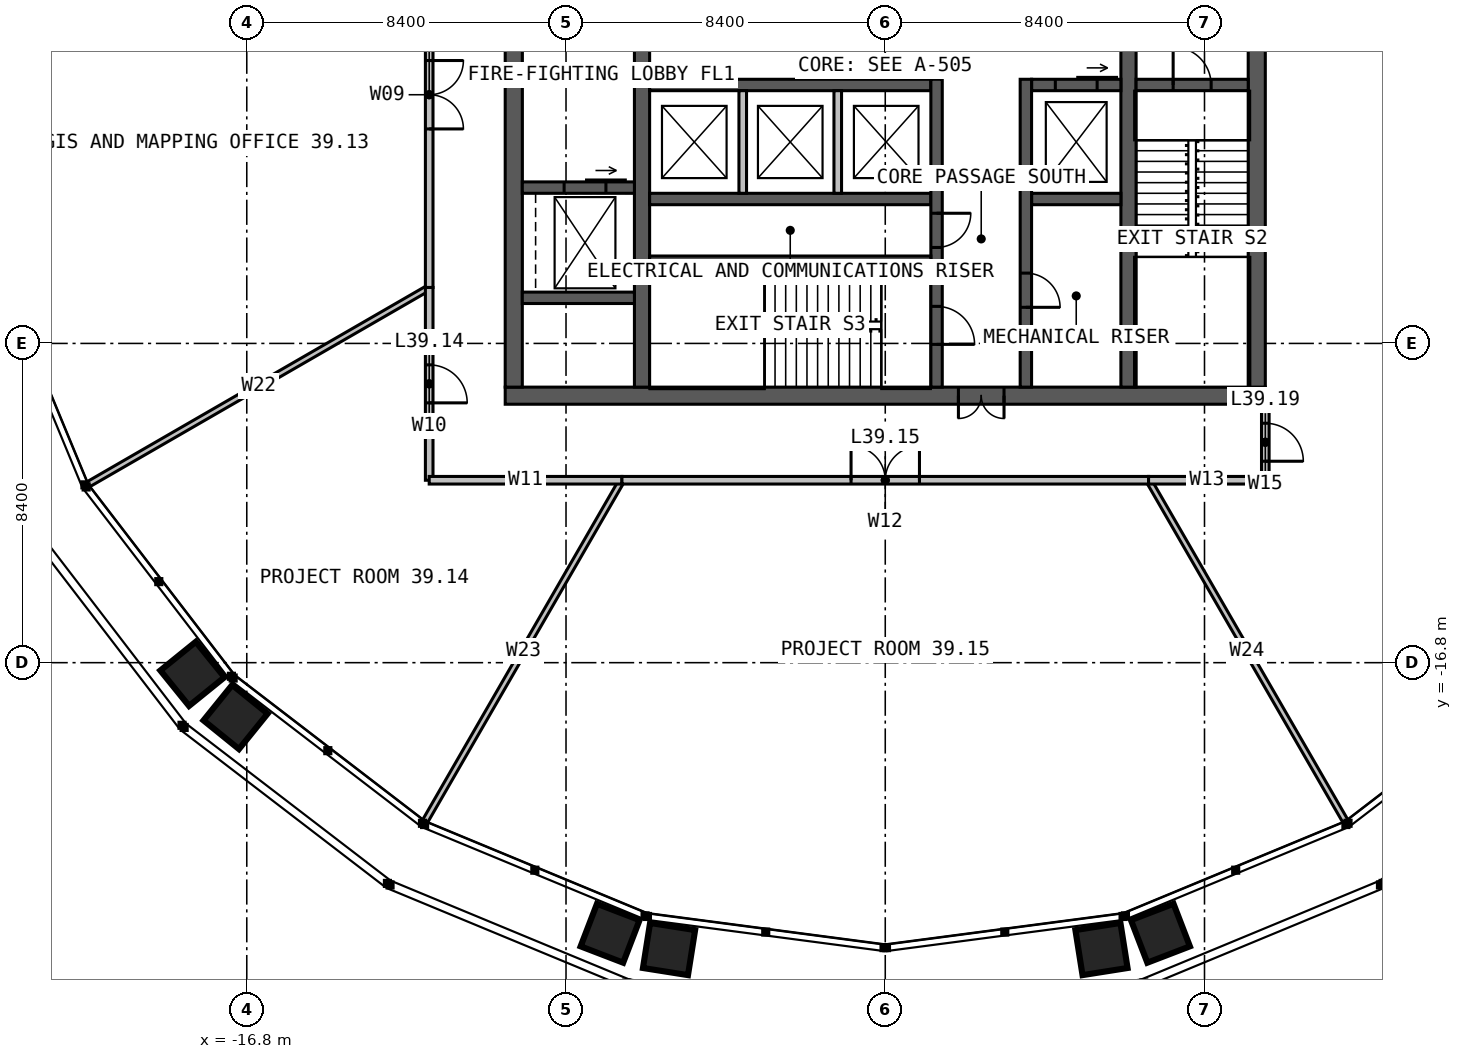
"""IFC4 building model, lengths in metres.
Left out: names, types, materials, properties, quantities, classifications, styles, units other than length and angle.
Written with IfcOpenShell. Run it as: python <this file> out.ifc"""

import sys

from ifc_helpers import new_model, si_unit, direction, frame, frame_2d, origin, place, context, subcontext, project, spatial, rectangle, extrude, element, fill, save


model = new_model("IFC4")
c1 = context("Model", 3, precision=1e-05, world=origin(), true_north=direction((0.0, 1.0)))
c2 = subcontext(c1, "Body", "Model", "MODEL_VIEW")
j1 = project(units=[si_unit("LENGTHUNIT", "METRE"), si_unit("PLANEANGLEUNIT", "RADIAN")], contexts=[c1])
p1 = place(None, origin())
s1 = spatial("IfcSite", under=j1, at=p1, CompositionType="ELEMENT")
p2 = place(p1, origin())
s2 = spatial("IfcBuilding", under=s1, at=p2, CompositionType="ELEMENT")
p3 = place(p2, frame((0.0, 0.0, 163.0)))
s3 = spatial("IfcBuildingStorey", under=s2, at=p3, CompositionType="ELEMENT", Elevation=163.0)
p4 = place(p3, frame((10.0, -9.775, 0.0), z_axis=(0.0, 0.0, 1.0), x_axis=(-1.0, 0.0, 0.0)))
e1 = element("IfcWall", 1, at=p4, inside=s3, PredefinedType="SOLIDWALL", context=c2, shape_type="SweptSolid", body=[
    extrude(rectangle(XDim=20.0, YDim=0.45, at=frame_2d((10.0, 0.0))), origin(), (0.0, 0.0, 1.0), 4.0),
])
p5 = place(p4, frame((6.875, 0.0, 0.0)))
e2 = element("IfcOpeningElement", 2, at=p5, cuts=e1, PredefinedType="OPENING", context=c2, shape_type="SweptSolid", body=[
    extrude(rectangle(XDim=1.2, YDim=2.2, at=frame_2d((0.6, 1.1))), frame((0.0, 0.235, 0.0), z_axis=(0.0, -1.0, 0.0), x_axis=(1.0, 0.0, 0.0)), (0.0, 0.0, 1.0), 0.47),
])
for number, where, z_axis, x_axis in (
    (3, (9.775, -9.55, 0.0), (0.0, 0.0, 1.0), (0.0, 1.0, 0.0)),
    (4, (-9.775, 9.55, 0.0), (0.0, 0.0, 1.0), (0.0, -1.0, 0.0)),
):
    element("IfcWall", number, at=place(p3, frame(where, z_axis=z_axis, x_axis=x_axis)), inside=s3, PredefinedType="SOLIDWALL", context=c2, shape_type="SweptSolid", body=[
        extrude(rectangle(XDim=19.1, YDim=0.45, at=frame_2d((9.55, 0.0))), origin(), (0.0, 0.0, 1.0), 4.0),
    ])
p6 = place(p3, frame((-6.4, -9.55, 0.0), z_axis=(0.0, 0.0, 1.0), x_axis=(0.0, 1.0, 0.0)))
e5 = element("IfcWall", 5, at=p6, inside=s3, PredefinedType="SOLIDWALL", context=c2, shape_type="SweptSolid", body=[
    extrude(rectangle(XDim=19.1, YDim=0.4, at=frame_2d((9.55, 0.0))), origin(), (0.0, 0.0, 1.0), 4.0),
])
p7 = place(p6, frame((9.05, 0.0, 0.0)))
e6 = element("IfcOpeningElement", 6, at=p7, cuts=e5, PredefinedType="OPENING", context=c2, shape_type="SweptSolid", body=[
    extrude(rectangle(XDim=1.0, YDim=2.2, at=frame_2d((0.5, 1.1))), frame((0.0, 0.21, 0.0), z_axis=(0.0, -1.0, 0.0), x_axis=(1.0, 0.0, 0.0)), (0.0, 0.0, 1.0), 0.42),
])
p8 = place(p3, frame((6.4, 9.55, 0.0), z_axis=(0.0, 0.0, 1.0), x_axis=(0.0, -1.0, 0.0)))
e7 = element("IfcWall", 7, at=p8, inside=s3, PredefinedType="SOLIDWALL", context=c2, shape_type="SweptSolid", body=[
    extrude(rectangle(XDim=19.1, YDim=0.4, at=frame_2d((9.55, 0.0))), origin(), (0.0, 0.0, 1.0), 4.0),
])
p9 = place(p8, frame((9.05, 0.0, 0.0)))
e8 = element("IfcOpeningElement", 8, at=p9, cuts=e7, PredefinedType="OPENING", context=c2, shape_type="SweptSolid", body=[
    extrude(rectangle(XDim=1.0, YDim=2.2, at=frame_2d((0.5, 1.1))), frame((0.0, 0.21, 0.0), z_axis=(0.0, -1.0, 0.0), x_axis=(1.0, 0.0, 0.0)), (0.0, 0.0, 1.0), 0.42),
])
p10 = place(p3, frame((-6.2, -1.6, 0.0), z_axis=(0.0, 0.0, 1.0), x_axis=(1.0, 0.0, 0.0)))
e9 = element("IfcWall", 9, at=p10, inside=s3, PredefinedType="SOLIDWALL", context=c2, shape_type="SweptSolid", body=[
    extrude(rectangle(XDim=7.4, YDim=0.3, at=frame_2d((3.7, 0.0))), origin(), (0.0, 0.0, 1.0), 4.0),
])
p11 = place(p3, frame((3.85, -1.6, 0.0), z_axis=(0.0, 0.0, 1.0), x_axis=(1.0, 0.0, 0.0)))
e10 = element("IfcWall", 10, at=p11, inside=s3, PredefinedType="SOLIDWALL", context=c2, shape_type="SweptSolid", body=[
    extrude(rectangle(XDim=2.35, YDim=0.3, at=frame_2d((1.175, 0.0))), origin(), (0.0, 0.0, 1.0), 4.0),
])
p12 = place(p11, frame((0.625, 0.0, 0.0)))
e11 = element("IfcOpeningElement", 11, at=p12, cuts=e10, PredefinedType="OPENING", context=c2, shape_type="SweptSolid", body=[
    extrude(rectangle(XDim=1.1, YDim=2.2, at=frame_2d((0.55, 1.1))), frame((0.0, 0.16, 0.0), z_axis=(0.0, -1.0, 0.0), x_axis=(1.0, 0.0, 0.0)), (0.0, 0.0, 1.0), 0.32),
])
p13 = place(p3, frame((-6.2, -4.6, 0.0), z_axis=(0.0, 0.0, 1.0), x_axis=(1.0, 0.0, 0.0)))
e12 = element("IfcWall", 12, at=p13, inside=s3, PredefinedType="SOLIDWALL", context=c2, shape_type="SweptSolid", body=[
    extrude(rectangle(XDim=7.4, YDim=0.3, at=frame_2d((3.7, 0.0))), origin(), (0.0, 0.0, 1.0), 4.0),
])
p14 = place(p3, frame((3.85, -4.6, 0.0), z_axis=(0.0, 0.0, 1.0), x_axis=(1.0, 0.0, 0.0)))
e13 = element("IfcWall", 13, at=p14, inside=s3, PredefinedType="SOLIDWALL", context=c2, shape_type="SweptSolid", body=[
    extrude(rectangle(XDim=2.35, YDim=0.3, at=frame_2d((1.175, 0.0))), origin(), (0.0, 0.0, 1.0), 4.0),
])
p15 = place(p3, frame((1.35, -1.45, 0.0), z_axis=(0.0, 0.0, 1.0), x_axis=(0.0, -1.0, 0.0)))
e14 = element("IfcWall", 14, at=p15, inside=s3, PredefinedType="SOLIDWALL", context=c2, shape_type="SweptSolid", body=[
    extrude(rectangle(XDim=8.1, YDim=0.3, at=frame_2d((4.05, 0.0))), origin(), (0.0, 0.0, 1.0), 4.0),
])
p16 = place(p15, frame((5.975, 0.0, 0.0)))
e15 = element("IfcOpeningElement", 15, at=p16, cuts=e14, PredefinedType="OPENING", context=c2, shape_type="SweptSolid", body=[
    extrude(rectangle(XDim=1.0, YDim=2.2, at=frame_2d((0.5, 1.1))), frame((0.0, 0.16, 0.0), z_axis=(0.0, -1.0, 0.0), x_axis=(1.0, 0.0, 0.0)), (0.0, 0.0, 1.0), 0.32),
])
p17 = place(p15, frame((3.525, 0.0, 0.0)))
e16 = element("IfcOpeningElement", 16, at=p17, cuts=e14, PredefinedType="OPENING", context=c2, shape_type="SweptSolid", body=[
    extrude(rectangle(XDim=0.9, YDim=2.2, at=frame_2d((0.45, 1.1))), frame((0.0, 0.16, 0.0), z_axis=(0.0, -1.0, 0.0), x_axis=(1.0, 0.0, 0.0)), (0.0, 0.0, 1.0), 0.32),
])
p18 = place(p3, frame((3.7, -1.45, 0.0), z_axis=(0.0, 0.0, 1.0), x_axis=(0.0, -1.0, 0.0)))
e17 = element("IfcWall", 17, at=p18, inside=s3, PredefinedType="SOLIDWALL", context=c2, shape_type="SweptSolid", body=[
    extrude(rectangle(XDim=8.1, YDim=0.3, at=frame_2d((4.05, 0.0))), origin(), (0.0, 0.0, 1.0), 4.0),
])
p19 = place(p18, frame((5.1, 0.0, 0.0)))
e18 = element("IfcOpeningElement", 18, at=p19, cuts=e17, PredefinedType="OPENING", context=c2, shape_type="SweptSolid", body=[
    extrude(rectangle(XDim=0.9, YDim=2.2, at=frame_2d((0.45, 1.1))), frame((0.0, 0.16, 0.0), z_axis=(0.0, -1.0, 0.0), x_axis=(1.0, 0.0, 0.0)), (0.0, 0.0, 1.0), 0.32),
])
p20 = place(p3, frame((-6.2, -6.2, 0.0), z_axis=(0.0, 0.0, 1.0), x_axis=(1.0, 0.0, 0.0)))
e19 = element("IfcWall", 19, at=p20, inside=s3, PredefinedType="SOLIDWALL", context=c2, shape_type="SweptSolid", body=[
    extrude(rectangle(XDim=7.4, YDim=0.2, at=frame_2d((3.7, 0.0))), origin(), (0.0, 0.0, 1.0), 4.0),
])
p21 = place(p3, frame((6.6, -1.6, 0.0), z_axis=(0.0, 0.0, 1.0), x_axis=(1.0, 0.0, 0.0)))
e20 = element("IfcWall", 20, at=p21, inside=s3, PredefinedType="SOLIDWALL", context=c2, shape_type="SweptSolid", body=[
    extrude(rectangle(XDim=2.95, YDim=0.3, at=frame_2d((1.475, 0.0))), origin(), (0.0, 0.0, 1.0), 4.0),
])
p22 = place(p21, frame((0.975, 0.0, 0.0)))
e21 = element("IfcOpeningElement", 21, at=p22, cuts=e20, PredefinedType="OPENING", context=c2, shape_type="SweptSolid", body=[
    extrude(rectangle(XDim=1.0, YDim=2.2, at=frame_2d((0.5, 1.1))), frame((0.0, 0.16, 0.0), z_axis=(0.0, -1.0, 0.0), x_axis=(1.0, 0.0, 0.0)), (0.0, 0.0, 1.0), 0.32),
])
p23 = place(p3, frame((-9.55, -4.3, 0.0), z_axis=(0.0, 0.0, 1.0), x_axis=(1.0, 0.0, 0.0)))
e22 = element("IfcWall", 22, at=p23, inside=s3, PredefinedType="SOLIDWALL", context=c2, shape_type="SweptSolid", body=[
    extrude(rectangle(XDim=2.95, YDim=0.3, at=frame_2d((1.475, 0.0))), origin(), (0.0, 0.0, 1.0), 4.0),
])
p24 = place(p23, frame((1.1, 0.0, 0.0)))
e23 = element("IfcOpeningElement", 23, at=p24, cuts=e22, PredefinedType="OPENING", context=c2, shape_type="SweptSolid", body=[
    extrude(rectangle(XDim=1.1, YDim=2.2, at=frame_2d((0.55, 1.1))), frame((0.0, 0.16, 0.0), z_axis=(0.0, -1.0, 0.0), x_axis=(1.0, 0.0, 0.0)), (0.0, 0.0, 1.0), 0.32),
])
p25 = place(p3, frame((-9.55, -7.2, 0.0), z_axis=(0.0, 0.0, 1.0), x_axis=(1.0, 0.0, 0.0)))
e24 = element("IfcWall", 24, at=p25, inside=s3, PredefinedType="SOLIDWALL", context=c2, shape_type="SweptSolid", body=[
    extrude(rectangle(XDim=2.95, YDim=0.3, at=frame_2d((1.475, 0.0))), origin(), (0.0, 0.0, 1.0), 4.0),
])
for number, where, z_axis, x_axis in (
    (25, (-3.75, -1.75, 0.0), (0.0, 0.0, 1.0), (0.0, -1.0, 0.0)),
    (26, (-1.25, -1.75, 0.0), (0.0, 0.0, 1.0), (0.0, -1.0, 0.0)),
):
    element("IfcWall", number, at=place(p3, frame(where, z_axis=z_axis, x_axis=x_axis)), inside=s3, PredefinedType="SOLIDWALL", context=c2, shape_type="SweptSolid", body=[
        extrude(rectangle(XDim=2.7, YDim=0.2, at=frame_2d((1.35, 0.0))), origin(), (0.0, 0.0, 1.0), 3.75),
    ])
for number, where, z_axis, x_axis in (
    (27, (-12.0, -6.928, 0.0), (0.0, 0.0, 1.0), (-0.866, -0.5, 0.0)),
    (28, (-6.928, -12.0, 0.0), (0.0, 0.0, 1.0), (-0.5, -0.866, 0.0)),
    (29, (6.928, -12.0, 0.0), (0.0, 0.0, 1.0), (0.5, -0.866, 0.0)),
):
    element("IfcWall", number, at=place(p3, frame(where, z_axis=z_axis, x_axis=x_axis)), inside=s3, PredefinedType="PARTITIONING", context=c2, shape_type="SweptSolid", body=[
        extrude(rectangle(XDim=10.355, YDim=0.15, at=frame_2d((5.177, 0.0))), origin(), (0.0, 0.0, 1.0), 2.79),
    ])
p26 = place(p3, frame((-12.0, 3.215, 0.0), z_axis=(0.0, 0.0, 1.0), x_axis=(0.0, -1.0, 0.0)))
e30 = element("IfcWall", 30, at=p26, inside=s3, PredefinedType="PARTITIONING", context=c2, shape_type="SweptSolid", body=[
    extrude(rectangle(XDim=10.144, YDim=0.2, at=frame_2d((5.072, 0.0))), origin(), (0.0, 0.0, 1.0), 3.8),
])
p27 = place(p26, frame((4.172, 0.0, 0.0)))
e31 = element("IfcOpeningElement", 31, at=p27, cuts=e30, PredefinedType="OPENING", context=c2, shape_type="SweptSolid", body=[
    extrude(rectangle(XDim=1.8, YDim=2.2, at=frame_2d((0.9, 1.1))), frame((0.0, 0.11, 0.0), z_axis=(0.0, -1.0, 0.0), x_axis=(1.0, 0.0, 0.0)), (0.0, 0.0, 1.0), 0.22),
])
p28 = place(p3, frame((-12.0, -6.928, 0.0), z_axis=(0.0, 0.0, 1.0), x_axis=(0.0, -1.0, 0.0)))
e32 = element("IfcWall", 32, at=p28, inside=s3, PredefinedType="PARTITIONING", context=c2, shape_type="SweptSolid", body=[
    extrude(rectangle(XDim=5.072, YDim=0.2, at=frame_2d((2.536, 0.0))), origin(), (0.0, 0.0, 1.0), 3.8),
])
p29 = place(p28, frame((2.036, 0.0, 0.0)))
e33 = element("IfcOpeningElement", 33, at=p29, cuts=e32, PredefinedType="OPENING", context=c2, shape_type="SweptSolid", body=[
    extrude(rectangle(XDim=1.0, YDim=2.2, at=frame_2d((0.5, 1.1))), frame((0.0, 0.11, 0.0), z_axis=(0.0, -1.0, 0.0), x_axis=(1.0, 0.0, 0.0)), (0.0, 0.0, 1.0), 0.22),
])
p30 = place(p3, frame((-12.0, -12.0, 0.0), z_axis=(0.0, 0.0, 1.0), x_axis=(1.0, 0.0, 0.0)))
e34 = element("IfcWall", 34, at=p30, inside=s3, PredefinedType="PARTITIONING", context=c2, shape_type="SweptSolid", body=[
    extrude(rectangle(XDim=5.072, YDim=0.2, at=frame_2d((2.536, 0.0))), origin(), (0.0, 0.0, 1.0), 3.8),
])
p31 = place(p3, frame((-6.928, -12.0, 0.0), z_axis=(0.0, 0.0, 1.0), x_axis=(1.0, 0.0, 0.0)))
e35 = element("IfcWall", 35, at=p31, inside=s3, PredefinedType="PARTITIONING", context=c2, shape_type="SweptSolid", body=[
    extrude(rectangle(XDim=13.856, YDim=0.2, at=frame_2d((6.928, 0.0))), origin(), (0.0, 0.0, 1.0), 3.8),
])
p32 = place(p31, frame((6.028, 0.0, 0.0)))
e36 = element("IfcOpeningElement", 36, at=p32, cuts=e35, PredefinedType="OPENING", context=c2, shape_type="SweptSolid", body=[
    extrude(rectangle(XDim=1.8, YDim=2.2, at=frame_2d((0.9, 1.1))), frame((0.0, 0.11, 0.0), z_axis=(0.0, -1.0, 0.0), x_axis=(1.0, 0.0, 0.0)), (0.0, 0.0, 1.0), 0.22),
])
p33 = place(p3, frame((6.928, -12.0, 0.0), z_axis=(0.0, 0.0, 1.0), x_axis=(1.0, 0.0, 0.0)))
e37 = element("IfcWall", 37, at=p33, inside=s3, PredefinedType="PARTITIONING", context=c2, shape_type="SweptSolid", body=[
    extrude(rectangle(XDim=3.072, YDim=0.2, at=frame_2d((1.536, 0.0))), origin(), (0.0, 0.0, 1.0), 3.8),
])
p34 = place(p3, frame((10.0, -10.0, 0.0), z_axis=(0.0, 0.0, 1.0), x_axis=(0.0, -1.0, 0.0)))
e38 = element("IfcWall", 38, at=p34, inside=s3, PredefinedType="PARTITIONING", context=c2, shape_type="SweptSolid", body=[
    extrude(rectangle(XDim=2.0, YDim=0.2, at=frame_2d((1.0, 0.0))), origin(), (0.0, 0.0, 1.0), 3.8),
])
p35 = place(p34, frame((0.5, 0.0, 0.0)))
e39 = element("IfcOpeningElement", 39, at=p35, cuts=e38, PredefinedType="OPENING", context=c2, shape_type="SweptSolid", body=[
    extrude(rectangle(XDim=1.0, YDim=2.2, at=frame_2d((0.5, 1.1))), frame((0.0, 0.11, 0.0), z_axis=(0.0, -1.0, 0.0), x_axis=(1.0, 0.0, 0.0)), (0.0, 0.0, 1.0), 0.22),
])
p36 = place(p5, origin())
e40 = element("IfcDoor", 40, at=p36, inside=s3, OperationType="DOUBLE_DOOR_SINGLE_SWING", PredefinedType="DOOR", context=c2, shape_type="SweptSolid", body=[
    extrude(rectangle(XDim=1.2, YDim=2.2, at=frame_2d((0.6, 1.1))), frame((0.0, 0.025, 0.0), z_axis=(0.0, -1.0, 0.0), x_axis=(1.0, 0.0, 0.0)), (0.0, 0.0, 1.0), 0.05),
])
fill(e2, e40)
p37 = place(p22, origin())
e41 = element("IfcDoor", 41, at=p37, inside=s3, OperationType="SINGLE_SWING_LEFT", PredefinedType="DOOR", context=c2, shape_type="SweptSolid", body=[
    extrude(rectangle(XDim=1.0, YDim=2.2, at=frame_2d((0.5, 1.1))), frame((0.0, 0.025, 0.0), z_axis=(0.0, -1.0, 0.0), x_axis=(1.0, 0.0, 0.0)), (0.0, 0.0, 1.0), 0.05),
])
fill(e21, e41)
p38 = place(p16, origin())
e42 = element("IfcDoor", 42, at=p38, inside=s3, OperationType="SINGLE_SWING_RIGHT", PredefinedType="DOOR", context=c2, shape_type="SweptSolid", body=[
    extrude(rectangle(XDim=1.0, YDim=2.2, at=frame_2d((0.5, 1.1))), frame((0.0, 0.025, 0.0), z_axis=(0.0, -1.0, 0.0), x_axis=(1.0, 0.0, 0.0)), (0.0, 0.0, 1.0), 0.05),
])
fill(e15, e42)
p39 = place(p17, origin())
e43 = element("IfcDoor", 43, at=p39, inside=s3, OperationType="SINGLE_SWING_LEFT", PredefinedType="DOOR", context=c2, shape_type="SweptSolid", body=[
    extrude(rectangle(XDim=0.9, YDim=2.2, at=frame_2d((0.45, 1.1))), frame((0.0, 0.025, 0.0), z_axis=(0.0, -1.0, 0.0), x_axis=(1.0, 0.0, 0.0)), (0.0, 0.0, 1.0), 0.05),
])
fill(e16, e43)
p40 = place(p19, origin())
e44 = element("IfcDoor", 44, at=p40, inside=s3, OperationType="SINGLE_SWING_RIGHT", PredefinedType="DOOR", context=c2, shape_type="SweptSolid", body=[
    extrude(rectangle(XDim=0.9, YDim=2.2, at=frame_2d((0.45, 1.1))), frame((0.0, 0.025, 0.0), z_axis=(0.0, -1.0, 0.0), x_axis=(1.0, 0.0, 0.0)), (0.0, 0.0, 1.0), 0.05),
])
fill(e18, e44)
p41 = place(p12, origin())
e45 = element("IfcDoor", 45, at=p41, inside=s3, OperationType="SLIDING_TO_LEFT", PredefinedType="DOOR", context=c2, shape_type="SweptSolid", body=[
    extrude(rectangle(XDim=1.1, YDim=2.2, at=frame_2d((0.55, 1.1))), frame((0.0, 0.025, 0.0), z_axis=(0.0, -1.0, 0.0), x_axis=(1.0, 0.0, 0.0)), (0.0, 0.0, 1.0), 0.05),
])
fill(e11, e45)
p42 = place(p24, origin())
e46 = element("IfcDoor", 46, at=p42, inside=s3, OperationType="SLIDING_TO_LEFT", PredefinedType="DOOR", context=c2, shape_type="SweptSolid", body=[
    extrude(rectangle(XDim=1.1, YDim=2.2, at=frame_2d((0.55, 1.1))), frame((0.0, 0.025, 0.0), z_axis=(0.0, -1.0, 0.0), x_axis=(1.0, 0.0, 0.0)), (0.0, 0.0, 1.0), 0.05),
])
fill(e23, e46)
p43 = place(p27, origin())
e47 = element("IfcDoor", 47, at=p43, inside=s3, OperationType="DOUBLE_DOOR_SINGLE_SWING", PredefinedType="DOOR", context=c2, shape_type="SweptSolid", body=[
    extrude(rectangle(XDim=1.8, YDim=2.2, at=frame_2d((0.9, 1.1))), frame((0.0, 0.025, 0.0), z_axis=(0.0, -1.0, 0.0), x_axis=(1.0, 0.0, 0.0)), (0.0, 0.0, 1.0), 0.05),
])
fill(e31, e47)
p44 = place(p29, origin())
e48 = element("IfcDoor", 48, at=p44, inside=s3, OperationType="SINGLE_SWING_RIGHT", PredefinedType="DOOR", context=c2, shape_type="SweptSolid", body=[
    extrude(rectangle(XDim=1.0, YDim=2.2, at=frame_2d((0.5, 1.1))), frame((0.0, 0.025, 0.0), z_axis=(0.0, -1.0, 0.0), x_axis=(1.0, 0.0, 0.0)), (0.0, 0.0, 1.0), 0.05),
])
fill(e33, e48)
p45 = place(p32, origin())
e49 = element("IfcDoor", 49, at=p45, inside=s3, OperationType="DOUBLE_DOOR_SINGLE_SWING", PredefinedType="DOOR", context=c2, shape_type="SweptSolid", body=[
    extrude(rectangle(XDim=1.8, YDim=2.2, at=frame_2d((0.9, 1.1))), frame((0.0, 0.025, 0.0), z_axis=(0.0, -1.0, 0.0), x_axis=(1.0, 0.0, 0.0)), (0.0, 0.0, 1.0), 0.05),
])
fill(e36, e49)
p46 = place(p35, origin())
e50 = element("IfcDoor", 50, at=p46, inside=s3, OperationType="SINGLE_SWING_RIGHT", PredefinedType="DOOR", context=c2, shape_type="SweptSolid", body=[
    extrude(rectangle(XDim=1.0, YDim=2.2, at=frame_2d((0.5, 1.1))), frame((0.0, 0.025, 0.0), z_axis=(0.0, -1.0, 0.0), x_axis=(1.0, 0.0, 0.0)), (0.0, 0.0, 1.0), 0.05),
])
fill(e39, e50)
save(model, sys.argv[1])
